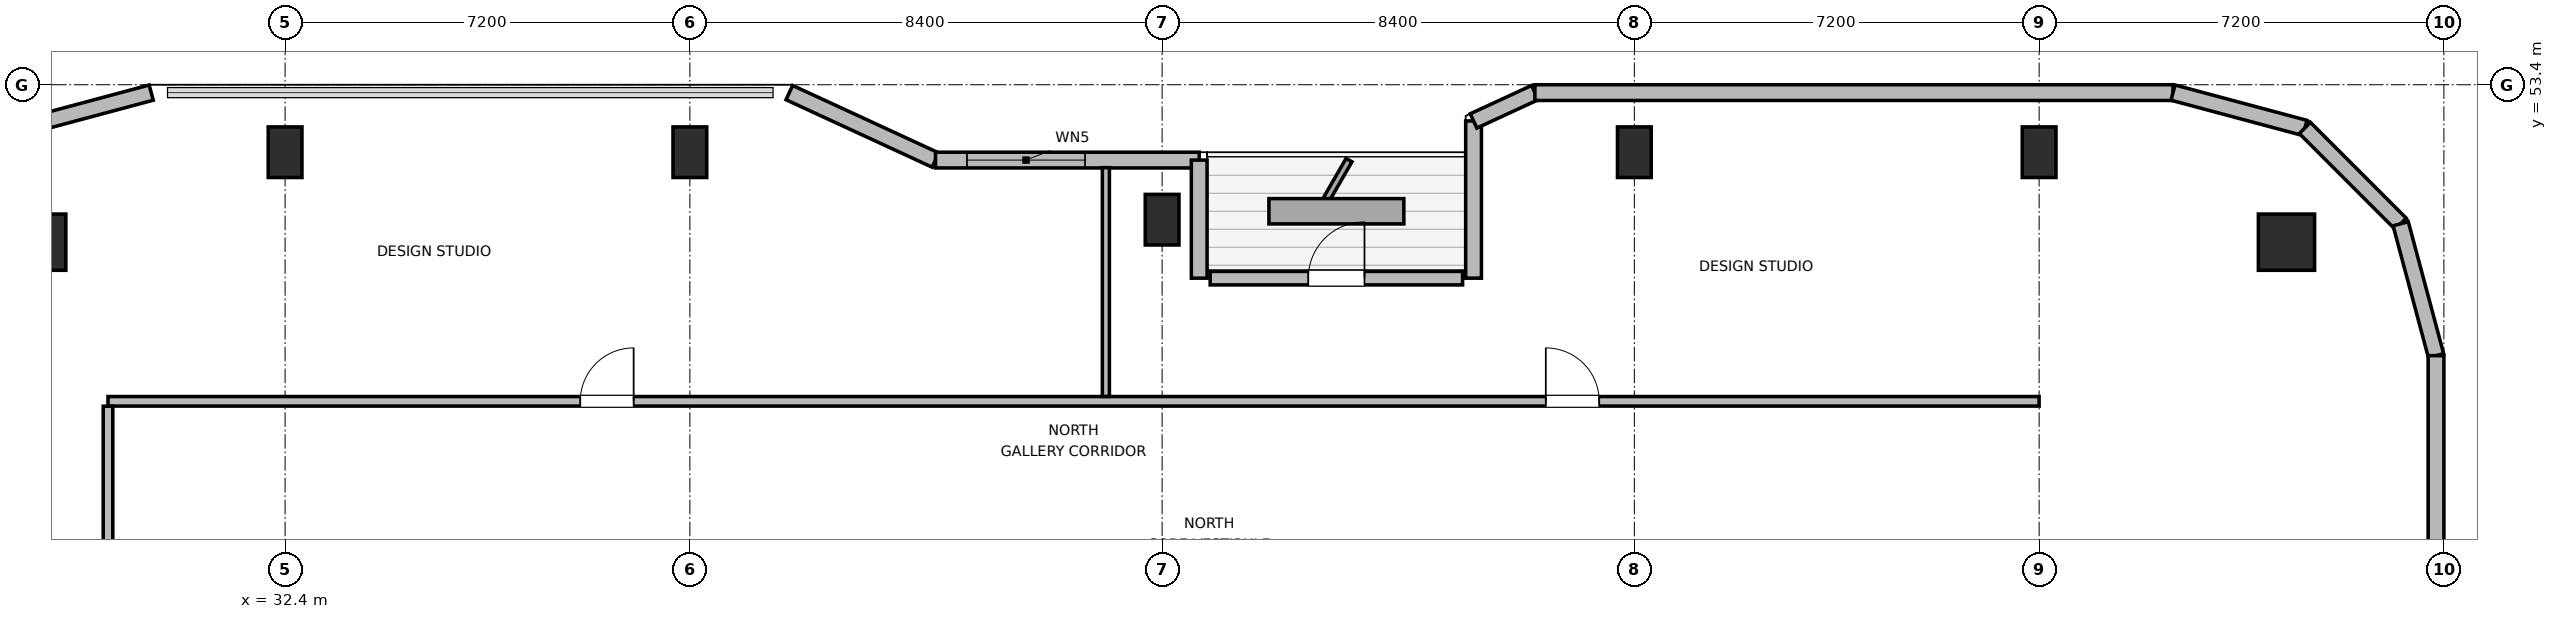
"""IFC4 building model, lengths in metres.
Left out: names, types, materials, properties, quantities, classifications, styles, units other than length and angle.
Written with IfcOpenShell. Run it as: python <this file> out.ifc"""

import sys

from ifc_helpers import new_model, si_unit, direction, frame, frame_2d, origin, origin_2d, place, context, subcontext, project, spatial, rectangle, circle, extrude, element, fill, save


model = new_model("IFC4")
c1 = context("Model", 3, precision=1e-05, world=origin(), true_north=direction((0.0, 1.0)))
c2 = subcontext(c1, "Body", "Model", "MODEL_VIEW")
j1 = project(units=[si_unit("LENGTHUNIT", "METRE"), si_unit("PLANEANGLEUNIT", "RADIAN")], contexts=[c1])
p1 = place(None, origin())
s1 = spatial("IfcSite", under=j1, at=p1, CompositionType="ELEMENT")
p2 = place(p1, origin())
s2 = spatial("IfcBuilding", under=s1, at=p2, CompositionType="ELEMENT")
p3 = place(p2, frame((0.0, 0.0, 286.2)))
s3 = spatial("IfcBuildingStorey", under=s2, at=p3, CompositionType="ELEMENT", Elevation=286.2)
for number, where, z_axis, x_axis in (
    (1, (68.0, 50.6, 0.0), (0.0, 0.0, 1.0), (1.0, 0.0, 0.0)),
    (2, (28.0, 50.6, 0.0), (0.0, 0.0, 1.0), (1.0, 0.0, 0.0)),
):
    element("IfcColumn", number, at=place(p3, frame(where, z_axis=z_axis, x_axis=x_axis)), inside=s3, PredefinedType="COLUMN", context=c2, shape_type="SweptSolid", body=[
        extrude(circle(Radius=0.5, at=origin_2d()), origin(), (0.0, 0.0, 1.0), 3.9),
    ])
for number, where, z_axis, x_axis in (
    (3, (32.4, 52.2, 0.0), (0.0, 0.0, 1.0), (1.0, 0.0, 0.0)),
    (4, (39.6, 52.2, 0.0), (0.0, 0.0, 1.0), (1.0, 0.0, 0.0)),
    (5, (48.0, 51.0, 0.0), (0.0, 0.0, 1.0), (1.0, 0.0, 0.0)),
    (6, (56.4, 52.2, 0.0), (0.0, 0.0, 1.0), (1.0, 0.0, 0.0)),
    (7, (63.6, 52.2, 0.0), (0.0, 0.0, 1.0), (1.0, 0.0, 0.0)),
):
    element("IfcColumn", number, at=place(p3, frame(where, z_axis=z_axis, x_axis=x_axis)), inside=s3, PredefinedType="COLUMN", context=c2, shape_type="SweptSolid", body=[
        extrude(rectangle(XDim=0.6, YDim=0.9, at=origin_2d()), origin(), (0.0, 0.0, 1.0), 3.9),
    ])
p4 = place(p3, frame((27.673, 52.632, 0.0), z_axis=(0.0, 0.0, 1.0), x_axis=(0.965937282298, 0.25877628691, 0.0)))
e8 = element("IfcWall", 8, at=p4, inside=s3, PredefinedType="SOLIDWALL", context=c2, shape_type="SweptSolid", body=[
    extrude(rectangle(XDim=2.428, YDim=0.28, at=frame_2d((1.214, 0.0))), origin(), (0.0, 0.0, 1.0), 3.68),
])
p5 = place(p3, frame((41.369, 53.26, 0.0), z_axis=(0.0, 0.0, 1.0), x_axis=(0.907956889006, -0.419063584324, 0.0)))
e9 = element("IfcWall", 9, at=p5, inside=s3, PredefinedType="SOLIDWALL", context=c2, shape_type="SweptSolid", body=[
    extrude(rectangle(XDim=2.864, YDim=0.28, at=frame_2d((1.432, 0.0))), origin(), (0.0, 0.0, 1.0), 2.265),
])
p6 = place(p3, frame((43.969, 52.06, 0.0), z_axis=(0.0, 0.0, 1.0), x_axis=(1.0, 0.0, 0.0)))
e10 = element("IfcWall", 10, at=p6, inside=s3, PredefinedType="SOLIDWALL", context=c2, shape_type="SweptSolid", body=[
    extrude(rectangle(XDim=4.691, YDim=0.28, at=frame_2d((2.345, 0.0))), origin(), (0.0, 0.0, 1.0), 2.265),
])
p7 = place(p6, frame((0.56, 0.0, 0.85)))
e11 = element("IfcOpeningElement", 11, at=p7, cuts=e10, PredefinedType="OPENING", context=c2, shape_type="SweptSolid", body=[
    extrude(rectangle(XDim=2.1, YDim=1.05, at=frame_2d((1.05, 0.525))), frame((0.0, 0.15, 0.0), z_axis=(0.0, -1.0, 0.0), x_axis=(1.0, 0.0, 0.0)), (0.0, 0.0, 1.0), 0.3),
])
p8 = place(p3, frame((48.66, 52.06, 0.0), z_axis=(0.0, 0.0, 1.0), x_axis=(0.0, -1.0, 0.0)))
e12 = element("IfcWall", 12, at=p8, inside=s3, PredefinedType="SOLIDWALL", context=c2, shape_type="SweptSolid", body=[
    extrude(rectangle(XDim=2.1, YDim=0.28, at=frame_2d((1.05, 0.0))), origin(), (0.0, 0.0, 1.0), 2.265),
])
p9 = place(p3, frame((48.855, 49.96, 0.0), z_axis=(0.0, 0.0, 1.0), x_axis=(1.0, 0.0, 0.0)))
e13 = element("IfcWall", 13, at=p9, inside=s3, PredefinedType="SOLIDWALL", context=c2, shape_type="SweptSolid", body=[
    extrude(rectangle(XDim=4.49, YDim=0.24, at=frame_2d((2.245, 0.0))), origin(), (0.0, 0.0, 1.0), 3.68),
])
p10 = place(p9, frame((1.745, 0.0, 0.0)))
e14 = element("IfcOpeningElement", 14, at=p10, cuts=e13, PredefinedType="OPENING", context=c2, shape_type="SweptSolid", body=[
    extrude(rectangle(XDim=1.0, YDim=2.02, at=frame_2d((0.5, 1.01))), frame((0.0, 0.13, 0.0), z_axis=(0.0, -1.0, 0.0), x_axis=(1.0, 0.0, 0.0)), (0.0, 0.0, 1.0), 0.26),
])
p11 = place(p3, frame((53.54, 49.96, 0.0), z_axis=(0.0, 0.0, 1.0), x_axis=(0.0, 1.0, 0.0)))
e15 = element("IfcWall", 15, at=p11, inside=s3, PredefinedType="SOLIDWALL", context=c2, shape_type="SweptSolid", body=[
    extrude(rectangle(XDim=2.796, YDim=0.28, at=frame_2d((1.398, 0.0))), origin(), (0.0, 0.0, 1.0), 2.265),
])
p12 = place(p3, frame((53.54, 52.756, 0.0), z_axis=(0.0, 0.0, 1.0), x_axis=(0.907893953211, 0.419199916176, 0.0)))
e16 = element("IfcWall", 16, at=p12, inside=s3, PredefinedType="SOLIDWALL", context=c2, shape_type="SweptSolid", body=[
    extrude(rectangle(XDim=1.201, YDim=0.28, at=frame_2d((0.601, 0.0))), origin(), (0.0, 0.0, 1.0), 3.68),
])
p13 = place(p3, frame((54.631, 53.26, 0.0), z_axis=(0.0, 0.0, 1.0), x_axis=(1.0, 0.0, 0.0)))
e17 = element("IfcWall", 17, at=p13, inside=s3, PredefinedType="SOLIDWALL", context=c2, shape_type="SweptSolid", body=[
    extrude(rectangle(XDim=11.351, YDim=0.28, at=frame_2d((5.675, 0.0))), origin(), (0.0, 0.0, 1.0), 3.68),
])
p14 = place(p3, frame((65.982, 53.26, 0.0), z_axis=(0.0, 0.0, 1.0), x_axis=(0.965937282298, -0.25877628691, 0.0)))
e18 = element("IfcWall", 18, at=p14, inside=s3, PredefinedType="SOLIDWALL", context=c2, shape_type="SweptSolid", body=[
    extrude(rectangle(XDim=2.428, YDim=0.28, at=frame_2d((1.214, 0.0))), origin(), (0.0, 0.0, 1.0), 3.68),
])
p15 = place(p3, frame((68.327, 52.632, 0.0), z_axis=(0.0, 0.0, 1.0), x_axis=(0.707106781187, -0.707106781187, 0.0)))
e19 = element("IfcWall", 19, at=p15, inside=s3, PredefinedType="SOLIDWALL", context=c2, shape_type="SweptSolid", body=[
    extrude(rectangle(XDim=2.41, YDim=0.28, at=frame_2d((1.205, 0.0))), origin(), (0.0, 0.0, 1.0), 3.68),
])
p16 = place(p3, frame((70.031, 50.927, 0.0), z_axis=(0.0, 0.0, 1.0), x_axis=(0.258751159445, -0.965944013639, 0.0)))
e20 = element("IfcWall", 20, at=p16, inside=s3, PredefinedType="SOLIDWALL", context=c2, shape_type="SweptSolid", body=[
    extrude(rectangle(XDim=2.429, YDim=0.28, at=frame_2d((1.214, 0.0))), origin(), (0.0, 0.0, 1.0), 3.68),
])
p17 = place(p3, frame((70.66, 48.582, 0.0), z_axis=(0.0, 0.0, 1.0), x_axis=(0.0, -1.0, 0.0)))
e21 = element("IfcWall", 21, at=p17, inside=s3, PredefinedType="SOLIDWALL", context=c2, shape_type="SweptSolid", body=[
    extrude(rectangle(XDim=5.842, YDim=0.28, at=frame_2d((2.921, 0.0))), origin(), (0.0, 0.0, 1.0), 3.68),
])
p18 = place(p3, frame((29.25, 47.77, 0.0), z_axis=(0.0, 0.0, 1.0), x_axis=(1.0, 0.0, 0.0)))
e22 = element("IfcWall", 22, at=p18, inside=s3, PredefinedType="PARTITIONING", context=c2, shape_type="SweptSolid", body=[
    extrude(rectangle(XDim=34.35, YDim=0.17, at=frame_2d((17.175, 0.0))), origin(), (0.0, 0.0, 1.0), 3.68),
])
p19 = place(p18, frame((8.4, 0.0, 0.0)))
e23 = element("IfcOpeningElement", 23, at=p19, cuts=e22, PredefinedType="OPENING", context=c2, shape_type="SweptSolid", body=[
    extrude(rectangle(XDim=0.95, YDim=2.04, at=frame_2d((0.475, 1.02))), frame((0.0, 0.095, 0.0), z_axis=(0.0, -1.0, 0.0), x_axis=(1.0, 0.0, 0.0)), (0.0, 0.0, 1.0), 0.19),
])
p20 = place(p18, frame((25.575, 0.0, 0.0)))
e24 = element("IfcOpeningElement", 24, at=p20, cuts=e22, PredefinedType="OPENING", context=c2, shape_type="SweptSolid", body=[
    extrude(rectangle(XDim=0.95, YDim=2.04, at=frame_2d((0.475, 1.02))), frame((0.0, 0.095, 0.0), z_axis=(0.0, -1.0, 0.0), x_axis=(1.0, 0.0, 0.0)), (0.0, 0.0, 1.0), 0.19),
])
p21 = place(p3, frame((29.25, 24.317, 0.0), z_axis=(0.0, 0.0, 1.0), x_axis=(0.0, 1.0, 0.0)))
e25 = element("IfcWall", 25, at=p21, inside=s3, PredefinedType="PARTITIONING", context=c2, shape_type="SweptSolid", body=[
    extrude(rectangle(XDim=23.366, YDim=0.17, at=frame_2d((11.683, 0.0))), origin(), (0.0, 0.0, 1.0), 3.68),
])
p22 = place(p21, frame((4.923, 0.0, 0.0)))
e26 = element("IfcOpeningElement", 26, at=p22, cuts=e25, PredefinedType="OPENING", context=c2, shape_type="SweptSolid", body=[
    extrude(rectangle(XDim=0.95, YDim=2.04, at=frame_2d((0.475, 1.02))), frame((0.0, 0.095, 0.0), z_axis=(0.0, -1.0, 0.0), x_axis=(1.0, 0.0, 0.0)), (0.0, 0.0, 1.0), 0.19),
])
p23 = place(p21, frame((16.693, 0.0, 0.0)))
e27 = element("IfcOpeningElement", 27, at=p23, cuts=e25, PredefinedType="OPENING", context=c2, shape_type="SweptSolid", body=[
    extrude(rectangle(XDim=0.95, YDim=2.04, at=frame_2d((0.475, 1.02))), frame((0.0, 0.095, 0.0), z_axis=(0.0, -1.0, 0.0), x_axis=(1.0, 0.0, 0.0)), (0.0, 0.0, 1.0), 0.19),
])
p24 = place(p3, frame((47.0, 47.857, 0.0), z_axis=(0.0, 0.0, 1.0), x_axis=(0.0, 1.0, 0.0)))
e28 = element("IfcWall", 28, at=p24, inside=s3, PredefinedType="PARTITIONING", context=c2, shape_type="SweptSolid", body=[
    extrude(rectangle(XDim=4.068, YDim=0.125, at=frame_2d((2.034, 0.0))), origin(), (0.0, 0.0, 1.0), 3.68),
])
p25 = place(p7, origin())
e29 = element("IfcWindow", 29, at=p25, inside=s3, PartitioningType="SINGLE_PANEL", PredefinedType="WINDOW", context=c2, shape_type="SweptSolid", body=[
    extrude(rectangle(XDim=2.1, YDim=1.05, at=frame_2d((1.05, 0.525))), frame((0.0, 0.03, 0.0), z_axis=(0.0, -1.0, 0.0), x_axis=(1.0, 0.0, 0.0)), (0.0, 0.0, 1.0), 0.06),
])
fill(e11, e29)
p26 = place(p10, origin())
e30 = element("IfcDoor", 30, at=p26, inside=s3, OperationType="SINGLE_SWING_RIGHT", PredefinedType="DOOR", context=c2, shape_type="SweptSolid", body=[
    extrude(rectangle(XDim=1.0, YDim=2.02, at=frame_2d((0.5, 1.01))), frame((0.0, 0.025, 0.0), z_axis=(0.0, -1.0, 0.0), x_axis=(1.0, 0.0, 0.0)), (0.0, 0.0, 1.0), 0.05),
])
fill(e14, e30)
p27 = place(p19, origin())
e31 = element("IfcDoor", 31, at=p27, inside=s3, OperationType="SINGLE_SWING_RIGHT", PredefinedType="DOOR", context=c2, shape_type="SweptSolid", body=[
    extrude(rectangle(XDim=0.95, YDim=2.04, at=frame_2d((0.475, 1.02))), frame((0.0, 0.025, 0.0), z_axis=(0.0, -1.0, 0.0), x_axis=(1.0, 0.0, 0.0)), (0.0, 0.0, 1.0), 0.05),
])
fill(e23, e31)
p28 = place(p20, origin())
e32 = element("IfcDoor", 32, at=p28, inside=s3, OperationType="SINGLE_SWING_LEFT", PredefinedType="DOOR", context=c2, shape_type="SweptSolid", body=[
    extrude(rectangle(XDim=0.95, YDim=2.04, at=frame_2d((0.475, 1.02))), frame((0.0, 0.025, 0.0), z_axis=(0.0, -1.0, 0.0), x_axis=(1.0, 0.0, 0.0)), (0.0, 0.0, 1.0), 0.05),
])
fill(e24, e32)
save(model, sys.argv[1])
